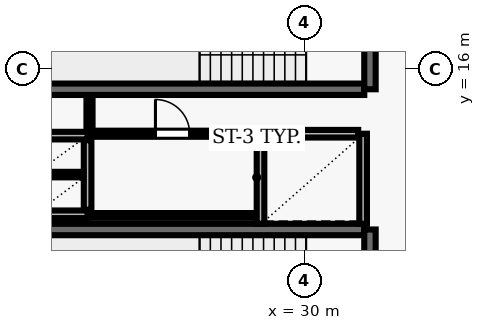
"""IFC4 building model, lengths in metres.
Left out: names, types, materials, properties, quantities, classifications, styles, units other than length and angle.
Written with IfcOpenShell. Run it as: python <this file> out.ifc"""

import sys

from ifc_helpers import new_model, si_unit, direction, frame, frame_2d, origin, place, context, subcontext, project, spatial, rectangle, extrude, element, fill, save


model = new_model("IFC4")
c1 = context("Model", 3, precision=1e-05, world=origin(), true_north=direction((0.0, 1.0)))
c2 = subcontext(c1, "Body", "Model", "MODEL_VIEW")
j1 = project(units=[si_unit("LENGTHUNIT", "METRE"), si_unit("PLANEANGLEUNIT", "RADIAN")], contexts=[c1])
p1 = place(None, origin())
s1 = spatial("IfcSite", under=j1, at=p1, CompositionType="ELEMENT")
p2 = place(p1, origin())
s2 = spatial("IfcBuilding", under=s1, at=p2, CompositionType="ELEMENT")
p3 = place(p2, frame((0.0, 0.0, 119.0)))
s3 = spatial("IfcBuildingStorey", under=s2, at=p3, CompositionType="ELEMENT", Elevation=119.0)
p4 = place(p3, frame((23.22, 15.47, 0.0), z_axis=(0.0, 0.0, 1.0), x_axis=(1.0, 0.0, 0.0)))
e1 = element("IfcWall", 1, at=p4, inside=s3, PredefinedType="SHEAR", context=c2, shape_type="SweptSolid", body=[
    extrude(rectangle(XDim=8.36, YDim=0.3, at=frame_2d((4.18, 0.0))), origin(), (0.0, 0.0, 1.0), 3.69),
])
p5 = place(p3, frame((31.73, 15.47, 0.0), z_axis=(0.0, 0.0, 1.0), x_axis=(0.0, 1.0, 0.0)))
e2 = element("IfcWall", 2, at=p5, inside=s3, PredefinedType="SHEAR", context=c2, shape_type="SweptSolid", body=[
    extrude(rectangle(XDim=3.51, YDim=0.3, at=frame_2d((1.755, 0.0))), origin(), (0.0, 0.0, 1.0), 3.69),
])
p6 = place(p5, frame((1.18, 0.0, 0.0)))
e3 = element("IfcOpeningElement", 3, at=p6, cuts=e2, PredefinedType="OPENING", context=c2, shape_type="SweptSolid", body=[
    extrude(rectangle(XDim=1.15, YDim=2.15, at=frame_2d((0.575, 1.075))), frame((0.0, 0.16, 0.0), z_axis=(0.0, -1.0, 0.0), x_axis=(1.0, 0.0, 0.0)), (0.0, 0.0, 1.0), 0.32),
])
p7 = place(p3, frame((31.58, 11.78, 0.0), z_axis=(0.0, 0.0, 1.0), x_axis=(-1.0, 0.0, 0.0)))
e4 = element("IfcWall", 4, at=p7, inside=s3, PredefinedType="SHEAR", context=c2, shape_type="SweptSolid", body=[
    extrude(rectangle(XDim=8.36, YDim=0.3, at=frame_2d((4.18, 0.0))), origin(), (0.0, 0.0, 1.0), 3.69),
])
p8 = place(p3, frame((31.73, 8.27, 0.0), z_axis=(0.0, 0.0, 1.0), x_axis=(0.0, 1.0, 0.0)))
e5 = element("IfcWall", 5, at=p8, inside=s3, PredefinedType="SHEAR", context=c2, shape_type="SweptSolid", body=[
    extrude(rectangle(XDim=3.51, YDim=0.3, at=frame_2d((1.755, 0.0))), origin(), (0.0, 0.0, 1.0), 3.69),
])
p9 = place(p8, frame((1.18, 0.0, 0.0)))
e6 = element("IfcOpeningElement", 6, at=p9, cuts=e5, PredefinedType="OPENING", context=c2, shape_type="SweptSolid", body=[
    extrude(rectangle(XDim=1.15, YDim=2.15, at=frame_2d((0.575, 1.075))), frame((0.0, 0.16, 0.0), z_axis=(0.0, -1.0, 0.0), x_axis=(1.0, 0.0, 0.0)), (0.0, 0.0, 1.0), 0.32),
])
for number, where, z_axis, x_axis in (
    (7, (28.85, 14.3, 0.0), (0.0, 0.0, 1.0), (0.0, -1.0, 0.0)),
    (8, (31.55, 11.93, 0.0), (0.0, 0.0, 1.0), (0.0, 1.0, 0.0)),
):
    element("IfcWall", number, at=place(p3, frame(where, z_axis=z_axis, x_axis=x_axis)), inside=s3, PredefinedType="SOLIDWALL", context=c2, shape_type="SweptSolid", body=[
        extrude(rectangle(XDim=2.37, YDim=0.2, at=frame_2d((1.185, 0.0))), origin(), (0.0, 0.0, 1.0), 3.69),
    ])
p10 = place(p3, frame((31.42, 14.3, 0.0), z_axis=(0.0, 0.0, 1.0), x_axis=(-1.0, 0.0, 0.0)))
e9 = element("IfcWall", 9, at=p10, inside=s3, PredefinedType="SOLIDWALL", context=c2, shape_type="SweptSolid", body=[
    extrude(rectangle(XDim=2.44, YDim=0.2, at=frame_2d((1.22, 0.0))), origin(), (0.0, 0.0, 1.0), 3.69),
])
for number, where, z_axis, x_axis in (
    (10, (22.9, 14.25, 0.0), (0.0, 0.0, 1.0), (1.0, 0.0, 0.0)),
    (11, (22.9, 12.18, 0.0), (0.0, 0.0, 1.0), (1.0, 0.0, 0.0)),
):
    element("IfcWall", number, at=place(p3, frame(where, z_axis=z_axis, x_axis=x_axis)), inside=s3, PredefinedType="SOLIDWALL", context=c2, shape_type="SweptSolid", body=[
        extrude(rectangle(XDim=1.4, YDim=0.2, at=frame_2d((0.7, 0.0))), origin(), (0.0, 0.0, 1.0), 3.69),
    ])
p11 = place(p3, frame((24.3, 12.3, 0.0), z_axis=(0.0, 0.0, 1.0), x_axis=(0.0, 1.0, 0.0)))
e12 = element("IfcWall", 12, at=p11, inside=s3, PredefinedType="SOLIDWALL", context=c2, shape_type="SweptSolid", body=[
    extrude(rectangle(XDim=1.83, YDim=0.2, at=frame_2d((0.915, 0.0))), origin(), (0.0, 0.0, 1.0), 3.69),
])
p12 = place(p3, frame((23.01, 13.225, 0.0), z_axis=(0.0, 0.0, 1.0), x_axis=(1.0, 0.0, 0.0)))
e13 = element("IfcWall", 13, at=p12, inside=s3, PredefinedType="PARTITIONING", context=c2, shape_type="SweptSolid", body=[
    extrude(rectangle(XDim=1.18, YDim=0.145, at=frame_2d((0.59, 0.0))), origin(), (0.0, 0.0, 1.0), 3.69),
])
p13 = place(p3, frame((24.35, 12.15, 0.0), z_axis=(0.0, 0.0, 1.0), x_axis=(1.0, 0.0, 0.0)))
e14 = element("IfcWall", 14, at=p13, inside=s3, PredefinedType="PARTITIONING", context=c2, shape_type="SweptSolid", body=[
    extrude(rectangle(XDim=4.37, YDim=0.125, at=frame_2d((2.185, 0.0))), origin(), (0.0, 0.0, 1.0), 3.69),
])
p14 = place(p3, frame((24.35, 14.3, 0.0), z_axis=(0.0, 0.0, 1.0), x_axis=(1.0, 0.0, 0.0)))
e15 = element("IfcWall", 15, at=p14, inside=s3, PredefinedType="PARTITIONING", context=c2, shape_type="SweptSolid", body=[
    extrude(rectangle(XDim=4.37, YDim=0.16, at=frame_2d((2.185, 0.0))), origin(), (0.0, 0.0, 1.0), 3.69),
])
p15 = place(p14, frame((1.735, 0.0, 0.0)))
e16 = element("IfcOpeningElement", 16, at=p15, cuts=e15, PredefinedType="OPENING", context=c2, shape_type="SweptSolid", body=[
    extrude(rectangle(XDim=0.9, YDim=2.1, at=frame_2d((0.45, 1.05))), frame((0.0, 0.09, 0.0), z_axis=(0.0, -1.0, 0.0), x_axis=(1.0, 0.0, 0.0)), (0.0, 0.0, 1.0), 0.18),
])
p16 = place(p3, frame((24.35, 15.29, 0.0), z_axis=(0.0, 0.0, 1.0), x_axis=(0.0, -1.0, 0.0)))
e17 = element("IfcWall", 17, at=p16, inside=s3, PredefinedType="PARTITIONING", context=c2, shape_type="SweptSolid", body=[
    extrude(rectangle(XDim=0.915, YDim=0.16, at=frame_2d((0.458, 0.0))), origin(), (0.0, 0.0, 1.0), 3.69),
])
p17 = place(p15, origin())
e18 = element("IfcDoor", 18, at=p17, inside=s3, OperationType="SINGLE_SWING_LEFT", PredefinedType="DOOR", context=c2, shape_type="SweptSolid", body=[
    extrude(rectangle(XDim=0.9, YDim=2.1, at=frame_2d((0.45, 1.05))), frame((0.0, 0.025, 0.0), z_axis=(0.0, -1.0, 0.0), x_axis=(1.0, 0.0, 0.0)), (0.0, 0.0, 1.0), 0.05),
])
fill(e16, e18)
save(model, sys.argv[1])
